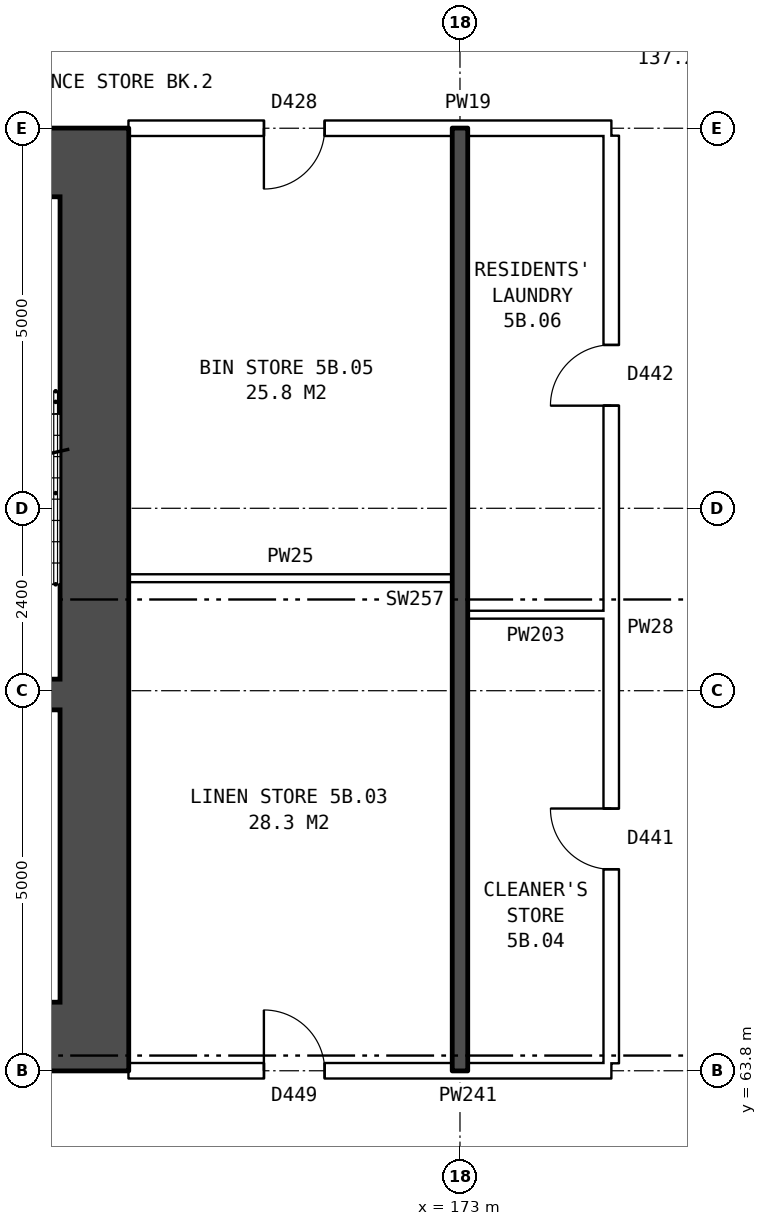
"""IFC4 building model, lengths in metres.
Left out: names, types, materials, properties, quantities, classifications, styles, units other than length and angle.
Written with IfcOpenShell. Run it as: python <this file> out.ifc"""

import sys

from ifc_helpers import new_model, si_unit, direction, frame, frame_2d, origin, place, context, subcontext, project, spatial, rectangle, extrude, element, fill, save


model = new_model("IFC4")
c1 = context("Model", 3, precision=1e-05, world=origin(), true_north=direction((0.0, 1.0)))
c2 = subcontext(c1, "Body", "Model", "MODEL_VIEW")
j1 = project(units=[si_unit("LENGTHUNIT", "METRE"), si_unit("PLANEANGLEUNIT", "RADIAN")], contexts=[c1])
p1 = place(None, origin())
s1 = spatial("IfcSite", under=j1, at=p1, CompositionType="ELEMENT")
p2 = place(p1, origin())
s2 = spatial("IfcBuilding", under=s1, at=p2, CompositionType="ELEMENT")
p3 = place(p2, frame((0.0, 0.0, 22.6)))
s3 = spatial("IfcBuildingStorey", under=s2, at=p3, CompositionType="ELEMENT", Elevation=22.6)
p4 = place(p3, frame((168.19, 75.3, 0.0), z_axis=(0.0, 0.0, 1.0), x_axis=(0.0, -1.0, 0.0)))
e1 = element("IfcWall", 1, at=p4, inside=s3, PredefinedType="SHEAR", context=c2, shape_type="SweptSolid", body=[
    extrude(rectangle(XDim=10.6, YDim=0.9, at=frame_2d((5.3, 0.0))), origin(), (0.0, 0.0, 1.0), 2.85),
])
for number, where, z_axis, x_axis in (
    (2, (160.24, 75.75, 0.0), (0.0, 0.0, 1.0), (1.0, 0.0, 0.0)),
    (3, (160.24, 64.25, 0.0), (0.0, 0.0, 1.0), (1.0, 0.0, 0.0)),
):
    element("IfcWall", number, at=place(p3, frame(where, z_axis=z_axis, x_axis=x_axis)), inside=s3, PredefinedType="SHEAR", context=c2, shape_type="SweptSolid", body=[
        extrude(rectangle(XDim=8.4, YDim=0.9, at=frame_2d((4.2, 0.0))), origin(), (0.0, 0.0, 1.0), 2.85),
    ])
p5 = place(p3, frame((161.14, 68.75, 0.0), z_axis=(0.0, 0.0, 1.0), x_axis=(1.0, 0.0, 0.0)))
e4 = element("IfcWall", 4, at=p5, inside=s3, PredefinedType="SHEAR", context=c2, shape_type="SweptSolid", body=[
    extrude(rectangle(XDim=6.6, YDim=0.4, at=frame_2d((3.3, 0.0))), origin(), (0.0, 0.0, 1.0), 2.85),
])
p6 = place(p5, frame((4.25, 0.0, 0.0)))
e5 = element("IfcOpeningElement", 5, at=p6, cuts=e4, PredefinedType="OPENING", context=c2, shape_type="SweptSolid", body=[
    extrude(rectangle(XDim=1.1, YDim=2.1, at=frame_2d((0.55, 1.05))), frame((0.0, 0.21, 0.0), z_axis=(0.0, -1.0, 0.0), x_axis=(1.0, 0.0, 0.0)), (0.0, 0.0, 1.0), 0.42),
])
p7 = place(p5, frame((2.6, 0.0, 0.0)))
e6 = element("IfcOpeningElement", 6, at=p7, cuts=e4, PredefinedType="OPENING", context=c2, shape_type="SweptSolid", body=[
    extrude(rectangle(XDim=0.85, YDim=2.1, at=frame_2d((0.425, 1.05))), frame((0.0, 0.21, 0.0), z_axis=(0.0, -1.0, 0.0), x_axis=(1.0, 0.0, 0.0)), (0.0, 0.0, 1.0), 0.42),
])
p8 = place(p3, frame((168.64, 63.8, 0.0), z_axis=(0.0, 0.0, 1.0), x_axis=(1.0, 0.0, 0.0)))
e7 = element("IfcWall", 7, at=p8, inside=s3, PredefinedType="PARTITIONING", context=c2, shape_type="SweptSolid", body=[
    extrude(rectangle(XDim=6.35, YDim=0.2, at=frame_2d((3.175, 0.0))), origin(), (0.0, 0.0, 1.0), 2.85),
])
p9 = place(p8, frame((1.78, 0.0, 0.0)))
e8 = element("IfcOpeningElement", 8, at=p9, cuts=e7, PredefinedType="OPENING", context=c2, shape_type="SweptSolid", body=[
    extrude(rectangle(XDim=0.8, YDim=2.1, at=frame_2d((0.4, 1.05))), frame((0.0, 0.11, 0.0), z_axis=(0.0, -1.0, 0.0), x_axis=(1.0, 0.0, 0.0)), (0.0, 0.0, 1.0), 0.22),
])
p10 = place(p3, frame((173.1, 69.8, 0.0), z_axis=(0.0, 0.0, 1.0), x_axis=(1.0, 0.0, 0.0)))
e9 = element("IfcWall", 9, at=p10, inside=s3, PredefinedType="PARTITIONING", context=c2, shape_type="SweptSolid", body=[
    extrude(rectangle(XDim=1.79, YDim=0.1, at=frame_2d((0.895, 0.0))), origin(), (0.0, 0.0, 1.0), 2.85),
])
p11 = place(p3, frame((168.64, 70.28, 0.0), z_axis=(0.0, 0.0, 1.0), x_axis=(1.0, 0.0, 0.0)))
e10 = element("IfcWall", 10, at=p11, inside=s3, PredefinedType="PARTITIONING", context=c2, shape_type="SweptSolid", body=[
    extrude(rectangle(XDim=4.26, YDim=0.1, at=frame_2d((2.13, 0.0))), origin(), (0.0, 0.0, 1.0), 2.85),
])
p12 = place(p3, frame((168.64, 76.2, 0.0), z_axis=(0.0, 0.0, 1.0), x_axis=(1.0, 0.0, 0.0)))
e11 = element("IfcWall", 11, at=p12, inside=s3, PredefinedType="PARTITIONING", context=c2, shape_type="SweptSolid", body=[
    extrude(rectangle(XDim=6.35, YDim=0.2, at=frame_2d((3.175, 0.0))), origin(), (0.0, 0.0, 1.0), 2.85),
])
p13 = place(p12, frame((1.78, 0.0, 0.0)))
e12 = element("IfcOpeningElement", 12, at=p13, cuts=e11, PredefinedType="OPENING", context=c2, shape_type="SweptSolid", body=[
    extrude(rectangle(XDim=0.8, YDim=2.1, at=frame_2d((0.4, 1.05))), frame((0.0, 0.11, 0.0), z_axis=(0.0, -1.0, 0.0), x_axis=(1.0, 0.0, 0.0)), (0.0, 0.0, 1.0), 0.22),
])
p14 = place(p3, frame((173.0, 63.8, 0.0), z_axis=(0.0, 0.0, 1.0), x_axis=(0.0, 1.0, 0.0)))
e13 = element("IfcWall", 13, at=p14, inside=s3, PredefinedType="SOLIDWALL", context=c2, shape_type="SweptSolid", body=[
    extrude(rectangle(XDim=12.4, YDim=0.2, at=frame_2d((6.2, 0.0))), origin(), (0.0, 0.0, 1.0), 2.85),
])
p15 = place(p3, frame((174.99, 63.9, 0.0), z_axis=(0.0, 0.0, 1.0), x_axis=(0.0, 1.0, 0.0)))
e14 = element("IfcWall", 14, at=p15, inside=s3, PredefinedType="PARTITIONING", context=c2, shape_type="SweptSolid", body=[
    extrude(rectangle(XDim=12.2, YDim=0.2, at=frame_2d((6.1, 0.0))), origin(), (0.0, 0.0, 1.0), 2.85),
])
p16 = place(p15, frame((2.55, 0.0, 0.0)))
e15 = element("IfcOpeningElement", 15, at=p16, cuts=e14, PredefinedType="OPENING", context=c2, shape_type="SweptSolid", body=[
    extrude(rectangle(XDim=0.8, YDim=2.1, at=frame_2d((0.4, 1.05))), frame((0.0, 0.11, 0.0), z_axis=(0.0, -1.0, 0.0), x_axis=(1.0, 0.0, 0.0)), (0.0, 0.0, 1.0), 0.22),
])
p17 = place(p15, frame((8.65, 0.0, 0.0)))
e16 = element("IfcOpeningElement", 16, at=p17, cuts=e14, PredefinedType="OPENING", context=c2, shape_type="SweptSolid", body=[
    extrude(rectangle(XDim=0.8, YDim=2.1, at=frame_2d((0.4, 1.05))), frame((0.0, 0.11, 0.0), z_axis=(0.0, -1.0, 0.0), x_axis=(1.0, 0.0, 0.0)), (0.0, 0.0, 1.0), 0.22),
])
p18 = place(p9, origin())
e17 = element("IfcDoor", 17, at=p18, inside=s3, OperationType="SINGLE_SWING_LEFT", PredefinedType="DOOR", context=c2, shape_type="SweptSolid", body=[
    extrude(rectangle(XDim=0.8, YDim=2.1, at=frame_2d((0.4, 1.05))), frame((0.0, 0.025, 0.0), z_axis=(0.0, -1.0, 0.0), x_axis=(1.0, 0.0, 0.0)), (0.0, 0.0, 1.0), 0.05),
])
fill(e8, e17)
p19 = place(p16, origin())
e18 = element("IfcDoor", 18, at=p19, inside=s3, OperationType="SINGLE_SWING_RIGHT", PredefinedType="DOOR", context=c2, shape_type="SweptSolid", body=[
    extrude(rectangle(XDim=0.8, YDim=2.1, at=frame_2d((0.4, 1.05))), frame((0.0, 0.025, 0.0), z_axis=(0.0, -1.0, 0.0), x_axis=(1.0, 0.0, 0.0)), (0.0, 0.0, 1.0), 0.05),
])
fill(e15, e18)
p20 = place(p13, frame((0.8, 0.0, 0.0), z_axis=(0.0, 0.0, 1.0), x_axis=(-1.0, 0.0, 0.0)))
e19 = element("IfcDoor", 19, at=p20, inside=s3, OperationType="SINGLE_SWING_RIGHT", PredefinedType="DOOR", context=c2, shape_type="SweptSolid", body=[
    extrude(rectangle(XDim=0.8, YDim=2.1, at=frame_2d((0.4, 1.05))), frame((0.0, 0.025, 0.0), z_axis=(0.0, -1.0, 0.0), x_axis=(1.0, 0.0, 0.0)), (0.0, 0.0, 1.0), 0.05),
])
fill(e12, e19)
p21 = place(p17, origin())
e20 = element("IfcDoor", 20, at=p21, inside=s3, OperationType="SINGLE_SWING_LEFT", PredefinedType="DOOR", context=c2, shape_type="SweptSolid", body=[
    extrude(rectangle(XDim=0.8, YDim=2.1, at=frame_2d((0.4, 1.05))), frame((0.0, 0.025, 0.0), z_axis=(0.0, -1.0, 0.0), x_axis=(1.0, 0.0, 0.0)), (0.0, 0.0, 1.0), 0.05),
])
fill(e16, e20)
save(model, sys.argv[1])
